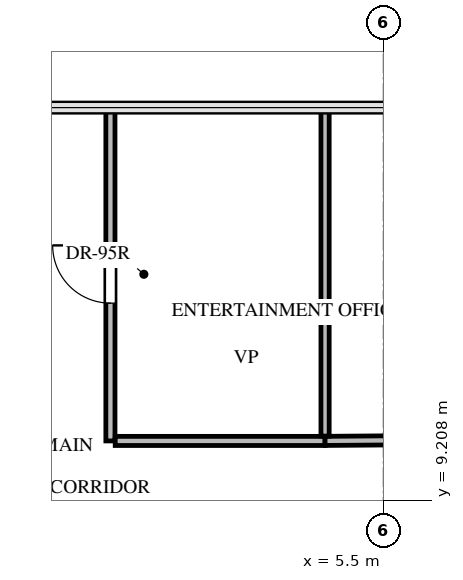
"""IFC4 building model, lengths in metres.
Left out: names, types, materials, properties, quantities, classifications, styles, units other than length and angle.
Written with IfcOpenShell. Run it as: python <this file> out.ifc"""

import sys

from ifc_helpers import new_model, si_unit, direction, frame, frame_2d, origin, place, context, subcontext, project, spatial, rectangle, extrude, source, transform, mapped, element, fill, save


model = new_model("IFC4")
c1 = context("Model", 3, precision=1e-05, world=origin(), true_north=direction((0.0, 1.0)))
c2 = subcontext(c1, "Body", "Model", "MODEL_VIEW")
j1 = project(units=[si_unit("LENGTHUNIT", "METRE"), si_unit("PLANEANGLEUNIT", "RADIAN")], contexts=[c1])
p1 = place(None, origin())
s1 = spatial("IfcSite", under=j1, at=p1, CompositionType="ELEMENT")
p2 = place(p1, origin())
s2 = spatial("IfcBuilding", under=s1, at=p2, CompositionType="ELEMENT")
p3 = place(p2, frame((0.0, 0.0, 228.2)))
s3 = spatial("IfcBuildingStorey", under=s2, at=p3, CompositionType="ELEMENT", Elevation=228.2)
p4 = place(p3, frame((1.01, 10.18, 0.0), z_axis=(0.0, 0.0, 1.0), x_axis=(0.0, 1.0, 0.0)))
e1 = element("IfcWall", 1, at=p4, inside=s3, PredefinedType="PARTITIONING", context=c2, shape_type="SweptSolid", body=[
    extrude(rectangle(XDim=5.482, YDim=0.15, at=frame_2d((2.741, 0.0))), origin(), (0.0, 0.0, 1.0), 2.399),
])
p5 = place(p4, frame((2.266, 0.0, 0.0)))
e2 = element("IfcOpeningElement", 2, at=p5, cuts=e1, PredefinedType="OPENING", context=c2, shape_type="SweptSolid", body=[
    extrude(rectangle(XDim=0.95, YDim=2.1, at=frame_2d((0.475, 1.05))), frame((0.0, 0.085, 0.0), z_axis=(0.0, -1.0, 0.0), x_axis=(1.0, 0.0, 0.0)), (0.0, 0.0, 1.0), 0.17),
])
p6 = place(p3, frame((4.54, 10.18, 0.0), z_axis=(0.0, 0.0, 1.0), x_axis=(-1.0, 0.0, 0.0)))
e3 = element("IfcWall", 3, at=p6, inside=s3, PredefinedType="PARTITIONING", context=c2, shape_type="SweptSolid", body=[
    extrude(rectangle(XDim=3.451, YDim=0.15, at=frame_2d((1.726, 0.0))), origin(), (0.0, 0.0, 1.0), 3.045),
])
p7 = place(p3, frame((12.368, 10.243, 0.0), z_axis=(0.0, 0.0, 1.0), x_axis=(-0.999968379606, -0.007952344825, 0.0)))
e4 = element("IfcWall", 4, at=p7, inside=s3, PredefinedType="PARTITIONING", context=c2, shape_type="SweptSolid", body=[
    extrude(rectangle(XDim=7.829, YDim=0.15, at=frame_2d((3.914, 0.0))), origin(), (0.0, 0.0, 1.0), 2.301),
])
p8 = place(p7, frame((3.454, 0.0, 0.0)))
e5 = element("IfcOpeningElement", 5, at=p8, cuts=e4, PredefinedType="OPENING", context=c2, shape_type="SweptSolid", body=[
    extrude(rectangle(XDim=0.92, YDim=2.1, at=frame_2d((0.46, 1.05))), frame((0.0, 0.085, 0.0), z_axis=(0.0, -1.0, 0.0), x_axis=(1.0, 0.0, 0.0)), (0.0, 0.0, 1.0), 0.17),
])
p9 = place(p3, frame((4.54, 15.662, 0.0), z_axis=(0.0, 0.0, 1.0), x_axis=(0.0, -1.0, 0.0)))
e6 = element("IfcWall", 6, at=p9, inside=s3, PredefinedType="PARTITIONING", context=c2, shape_type="SweptSolid", body=[
    extrude(rectangle(XDim=5.403, YDim=0.135, at=frame_2d((2.701, 0.0))), origin(), (0.0, 0.0, 1.0), 2.399),
])
m1 = source(origin(), c2, "Body", "SweptSolid", [
    extrude(rectangle(XDim=0.95, YDim=2.1, at=frame_2d((0.475, 1.05))), frame((0.0, 0.025, 0.0), z_axis=(0.0, -1.0, 0.0), x_axis=(1.0, 0.0, 0.0)), (0.0, 0.0, 1.0), 0.05),
])
p10 = place(p5, origin())
e7 = element("IfcDoor", 7, at=p10, inside=s3, OperationType="SINGLE_SWING_RIGHT", PredefinedType="DOOR", context=c2, shape_type="MappedRepresentation", body=[
    mapped(m1, transform((0.0, 0.0, 0.0), x_axis=(1.0, 0.0, 0.0), y_axis=(0.0, 1.0, 0.0), z_axis=(0.0, 0.0, 1.0), scale=1.0)),
])
fill(e2, e7)
save(model, sys.argv[1])
